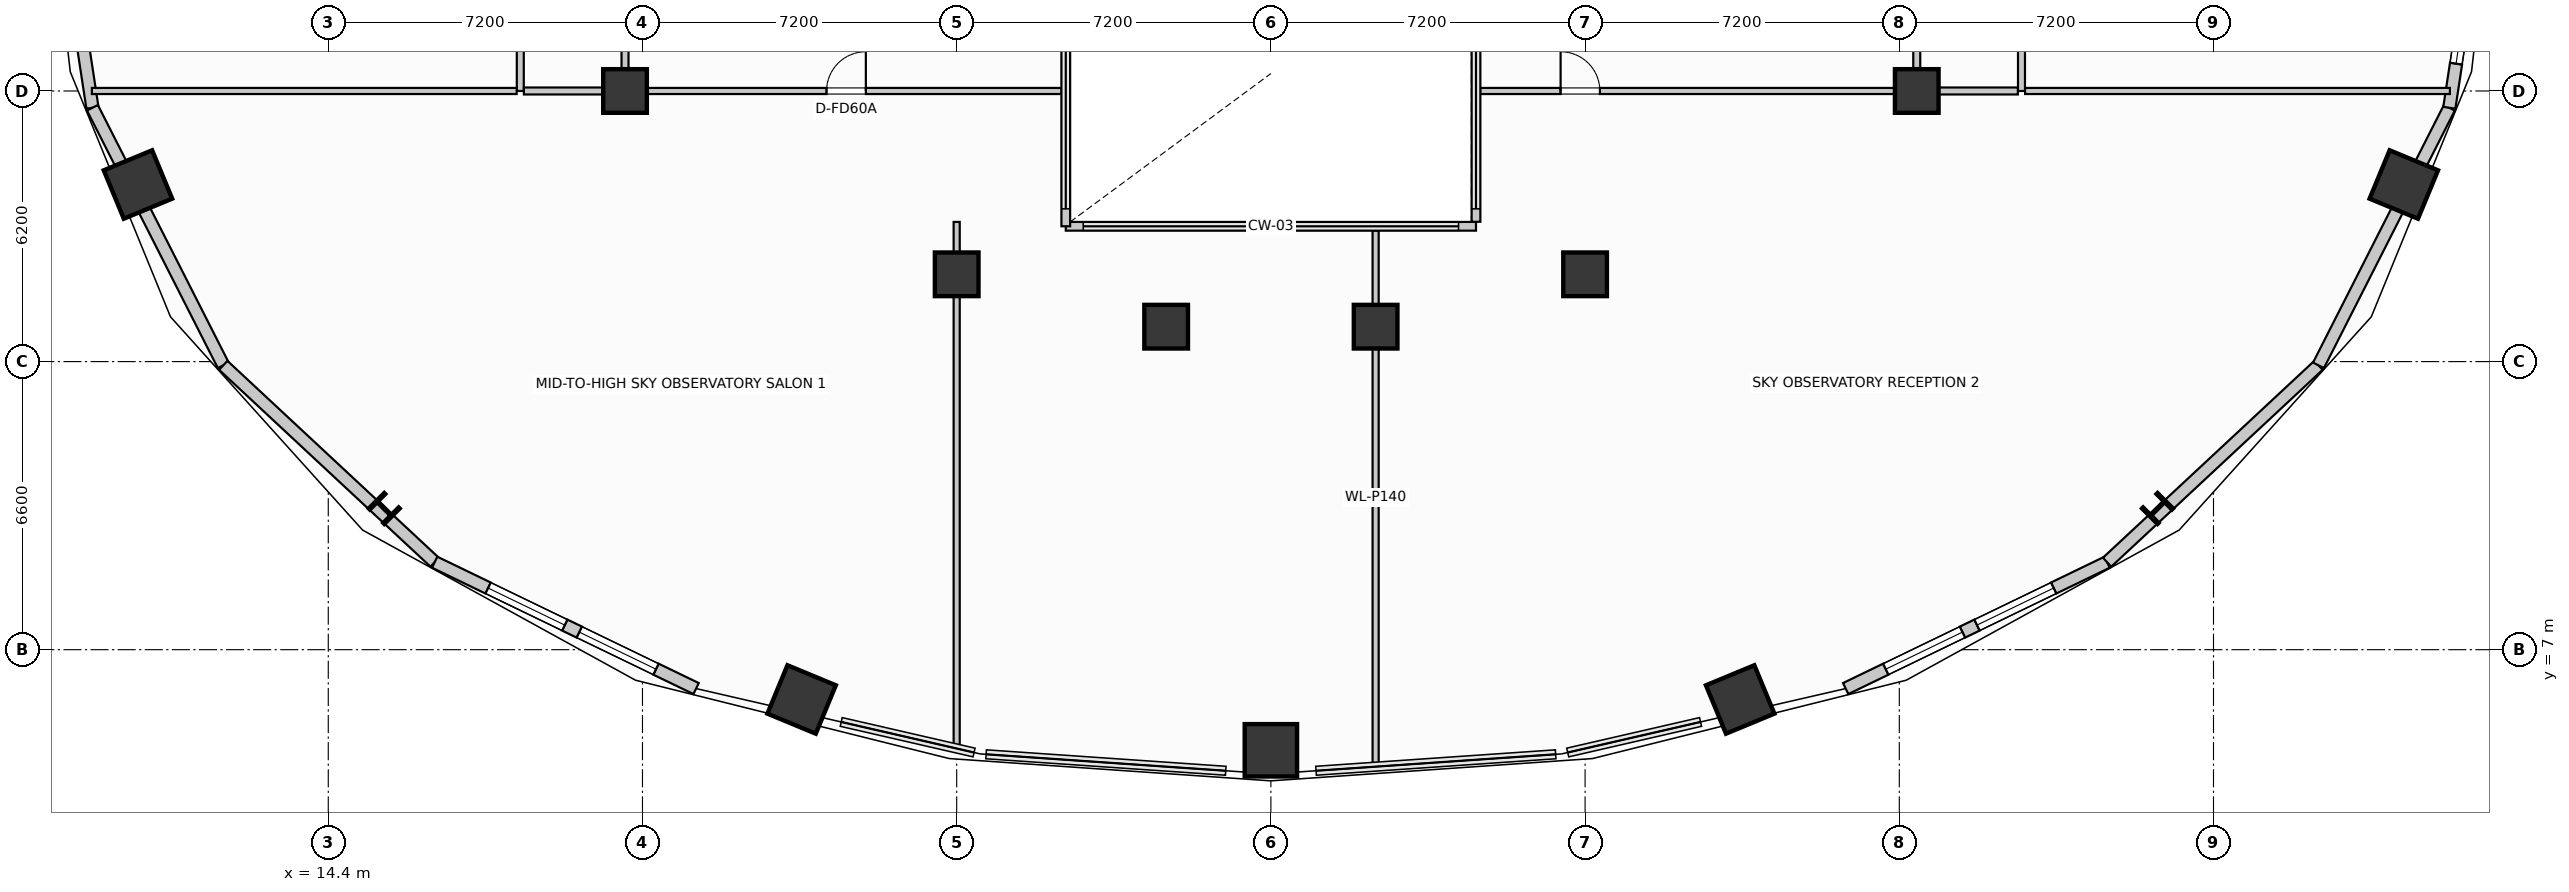
"""IFC4 building model, lengths in metres.
Left out: names, types, materials, properties, quantities, classifications, styles, units other than length and angle.
Written with IfcOpenShell. Run it as: python <this file> out.ifc"""

import sys

from ifc_helpers import new_model, si_unit, direction, frame, frame_2d, origin, origin_2d, place, context, subcontext, project, spatial, rectangle, i_section, extrude, element, fill, save


model = new_model("IFC4")
c1 = context("Model", 3, precision=1e-05, world=origin(), true_north=direction((0.0, 1.0)))
c2 = subcontext(c1, "Body", "Model", "MODEL_VIEW")
j1 = project(units=[si_unit("LENGTHUNIT", "METRE"), si_unit("PLANEANGLEUNIT", "RADIAN")], contexts=[c1])
p1 = place(None, origin())
s1 = spatial("IfcSite", under=j1, at=p1, CompositionType="ELEMENT")
p2 = place(p1, origin())
s2 = spatial("IfcBuilding", under=s1, at=p2, CompositionType="ELEMENT")
p3 = place(p2, frame((0.0, 0.0, 200.35)))
s3 = spatial("IfcBuildingStorey", under=s2, at=p3, CompositionType="ELEMENT", Elevation=200.35)
for number, where, z_axis, x_axis in (
    (1, (50.8, 19.8, 0.0), (0.0, 0.0, 1.0), (1.0, 0.0, 0.0)),
    (2, (43.2, 15.6, 0.0), (0.0, 0.0, 1.0), (1.0, 0.0, 0.0)),
    (3, (38.4, 14.4, 0.0), (0.0, 0.0, 1.0), (1.0, 0.0, 0.0)),
    (4, (33.6, 14.4, 0.0), (0.0, 0.0, 1.0), (1.0, 0.0, 0.0)),
    (5, (28.8, 15.6, 0.0), (0.0, 0.0, 1.0), (1.0, 0.0, 0.0)),
    (6, (21.2, 19.8, 0.0), (0.0, 0.0, 1.0), (1.0, 0.0, 0.0)),
):
    element("IfcColumn", number, at=place(p3, frame(where, z_axis=z_axis, x_axis=x_axis)), inside=s3, PredefinedType="COLUMN", context=c2, shape_type="SweptSolid", body=[
        extrude(rectangle(XDim=1.0, YDim=1.0, at=origin_2d()), origin(), (0.0, 0.0, 1.0), 4.5),
    ])
p4 = place(p3, frame((10.039, 17.657, 0.0), z_axis=(0.0, 0.0, 1.0), x_axis=(-0.923879532511, -0.382683432365, 0.0)))
e7 = element("IfcColumn", 7, at=p4, inside=s3, PredefinedType="COLUMN", context=c2, shape_type="SweptSolid", body=[
    extrude(rectangle(XDim=1.2, YDim=1.2, at=origin_2d()), origin(), (0.0, 0.0, 1.0), 4.5),
])
p5 = place(p3, frame((15.682, 10.235, 0.0), z_axis=(0.0, 0.0, 1.0), x_axis=(-0.707106781187, -0.707106781187, 0.0)))
e8 = element("IfcColumn", 8, at=p5, inside=s3, PredefinedType="COLUMN", context=c2, shape_type="SweptSolid", body=[
    extrude(i_section(OverallWidth=0.5, OverallDepth=0.5, WebThickness=0.022, FlangeThickness=0.032, at=origin_2d()), origin(), (0.0, 0.0, 1.0), 4.5),
])
for number, where, z_axis, x_axis in (
    (9, (25.247, 5.859, 0.0), (0.0, 0.0, 1.0), (-0.383, -0.924, 0.0)),
    (10, (36.0, 4.695, 0.0), (0.0, 0.0, 1.0), (0.0, -1.0, 0.0)),
    (11, (46.753, 5.859, 0.0), (0.0, 0.0, 1.0), (0.383, -0.924, 0.0)),
):
    element("IfcColumn", number, at=place(p3, frame(where, z_axis=z_axis, x_axis=x_axis)), inside=s3, PredefinedType="COLUMN", context=c2, shape_type="SweptSolid", body=[
        extrude(rectangle(XDim=1.2, YDim=1.2, at=origin_2d()), origin(), (0.0, 0.0, 1.0), 4.5),
    ])
p6 = place(p3, frame((56.318, 10.235, 0.0), z_axis=(0.0, 0.0, 1.0), x_axis=(0.707106781187, -0.707106781187, 0.0)))
e12 = element("IfcColumn", 12, at=p6, inside=s3, PredefinedType="COLUMN", context=c2, shape_type="SweptSolid", body=[
    extrude(i_section(OverallWidth=0.5, OverallDepth=0.5, WebThickness=0.022, FlangeThickness=0.032, at=origin_2d()), origin(), (0.0, 0.0, 1.0), 4.5),
])
p7 = place(p3, frame((61.961, 17.657, 0.0), z_axis=(0.0, 0.0, 1.0), x_axis=(0.923879532511, -0.382683432365, 0.0)))
e13 = element("IfcColumn", 13, at=p7, inside=s3, PredefinedType="COLUMN", context=c2, shape_type="SweptSolid", body=[
    extrude(rectangle(XDim=1.2, YDim=1.2, at=origin_2d()), origin(), (0.0, 0.0, 1.0), 4.5),
])
p8 = place(p3, frame((7.994, 26.0, 0.0), z_axis=(0.0, 0.0, 1.0), x_axis=(0.150467697578, -0.988614926038, 0.0)))
e14 = element("IfcWall", 14, at=p8, inside=s3, PredefinedType="STANDARD", context=c2, shape_type="SweptSolid", body=[
    extrude(rectangle(XDim=6.661, YDim=0.28, at=frame_2d((3.33, 0.0))), origin(), (0.0, 0.0, 1.0), 4.26),
])
p9 = place(p8, frame((3.047, 0.0, 0.75)))
e15 = element("IfcOpeningElement", 15, at=p9, cuts=e14, PredefinedType="OPENING", context=c2, shape_type="SweptSolid", body=[
    extrude(rectangle(XDim=1.95, YDim=1.68, at=frame_2d((0.975, 0.84))), frame((0.0, 0.15, 0.0), z_axis=(0.0, -1.0, 0.0), x_axis=(1.0, 0.0, 0.0)), (0.0, 0.0, 1.0), 0.3),
])
p10 = place(p3, frame((8.996, 19.415, 0.0), z_axis=(0.0, 0.0, 1.0), x_axis=(0.453032066879, -0.89149422117, 0.0)))
e16 = element("IfcWall", 16, at=p10, inside=s3, PredefinedType="STANDARD", context=c2, shape_type="SweptSolid", body=[
    extrude(rectangle(XDim=6.619, YDim=0.28, at=frame_2d((3.31, 0.0))), origin(), (0.0, 0.0, 1.0), 3.691),
])
p11 = place(p3, frame((11.994, 13.515, 0.0), z_axis=(0.0, 0.0, 1.0), x_axis=(0.731833707499, -0.681483253329, 0.0)))
e17 = element("IfcWall", 17, at=p11, inside=s3, PredefinedType="STANDARD", context=c2, shape_type="SweptSolid", body=[
    extrude(rectangle(XDim=6.619, YDim=0.28, at=frame_2d((3.309, 0.0))), origin(), (0.0, 0.0, 1.0), 3.691),
])
p12 = place(p3, frame((16.838, 9.004, 0.0), z_axis=(0.0, 0.0, 1.0), x_axis=(0.900371236029, -0.435122554381, 0.0)))
e18 = element("IfcWall", 18, at=p12, inside=s3, PredefinedType="STANDARD", context=c2, shape_type="SweptSolid", body=[
    extrude(rectangle(XDim=6.653, YDim=0.28, at=frame_2d((3.327, 0.0))), origin(), (0.0, 0.0, 1.0), 4.26),
])
p13 = place(p12, frame((1.361, 0.0, 0.75)))
e19 = element("IfcOpeningElement", 19, at=p13, cuts=e18, PredefinedType="OPENING", context=c2, shape_type="SweptSolid", body=[
    extrude(rectangle(XDim=1.95, YDim=1.68, at=frame_2d((0.975, 0.84))), frame((0.0, 0.15, 0.0), z_axis=(0.0, -1.0, 0.0), x_axis=(1.0, 0.0, 0.0)), (0.0, 0.0, 1.0), 0.3),
])
p14 = place(p12, frame((3.682, 0.0, 0.75)))
e20 = element("IfcOpeningElement", 20, at=p14, cuts=e18, PredefinedType="OPENING", context=c2, shape_type="SweptSolid", body=[
    extrude(rectangle(XDim=1.95, YDim=1.68, at=frame_2d((0.975, 0.84))), frame((0.0, 0.15, 0.0), z_axis=(0.0, -1.0, 0.0), x_axis=(1.0, 0.0, 0.0)), (0.0, 0.0, 1.0), 0.3),
])
p15 = place(p3, frame((49.171, 6.109, 0.0), z_axis=(0.0, 0.0, 1.0), x_axis=(0.900371236029, 0.435122554381, 0.0)))
e21 = element("IfcWall", 21, at=p15, inside=s3, PredefinedType="STANDARD", context=c2, shape_type="SweptSolid", body=[
    extrude(rectangle(XDim=6.653, YDim=0.28, at=frame_2d((3.327, 0.0))), origin(), (0.0, 0.0, 1.0), 4.26),
])
p16 = place(p15, frame((1.021, 0.0, 0.75)))
e22 = element("IfcOpeningElement", 22, at=p16, cuts=e21, PredefinedType="OPENING", context=c2, shape_type="SweptSolid", body=[
    extrude(rectangle(XDim=1.95, YDim=1.68, at=frame_2d((0.975, 0.84))), frame((0.0, 0.15, 0.0), z_axis=(0.0, -1.0, 0.0), x_axis=(1.0, 0.0, 0.0)), (0.0, 0.0, 1.0), 0.3),
])
p17 = place(p15, frame((3.343, 0.0, 0.75)))
e23 = element("IfcOpeningElement", 23, at=p17, cuts=e21, PredefinedType="OPENING", context=c2, shape_type="SweptSolid", body=[
    extrude(rectangle(XDim=1.95, YDim=1.68, at=frame_2d((0.975, 0.84))), frame((0.0, 0.15, 0.0), z_axis=(0.0, -1.0, 0.0), x_axis=(1.0, 0.0, 0.0)), (0.0, 0.0, 1.0), 0.3),
])
p18 = place(p3, frame((55.162, 9.004, 0.0), z_axis=(0.0, 0.0, 1.0), x_axis=(0.731833707499, 0.681483253329, 0.0)))
e24 = element("IfcWall", 24, at=p18, inside=s3, PredefinedType="STANDARD", context=c2, shape_type="SweptSolid", body=[
    extrude(rectangle(XDim=6.619, YDim=0.28, at=frame_2d((3.309, 0.0))), origin(), (0.0, 0.0, 1.0), 3.691),
])
p19 = place(p3, frame((60.006, 13.515, 0.0), z_axis=(0.0, 0.0, 1.0), x_axis=(0.453032066879, 0.89149422117, 0.0)))
e25 = element("IfcWall", 25, at=p19, inside=s3, PredefinedType="STANDARD", context=c2, shape_type="SweptSolid", body=[
    extrude(rectangle(XDim=6.619, YDim=0.28, at=frame_2d((3.31, 0.0))), origin(), (0.0, 0.0, 1.0), 3.691),
])
p20 = place(p3, frame((63.004, 19.415, 0.0), z_axis=(0.0, 0.0, 1.0), x_axis=(0.150467697578, 0.988614926038, 0.0)))
e26 = element("IfcWall", 26, at=p20, inside=s3, PredefinedType="STANDARD", context=c2, shape_type="SweptSolid", body=[
    extrude(rectangle(XDim=6.661, YDim=0.28, at=frame_2d((3.33, 0.0))), origin(), (0.0, 0.0, 1.0), 4.26),
])
p21 = place(p20, frame((1.023, 0.0, 0.75)))
e27 = element("IfcOpeningElement", 27, at=p21, cuts=e26, PredefinedType="OPENING", context=c2, shape_type="SweptSolid", body=[
    extrude(rectangle(XDim=1.95, YDim=1.68, at=frame_2d((0.975, 0.84))), frame((0.0, 0.15, 0.0), z_axis=(0.0, -1.0, 0.0), x_axis=(1.0, 0.0, 0.0)), (0.0, 0.0, 1.0), 0.3),
])
p22 = place(p3, frame((40.7, 16.7, 0.0), z_axis=(0.0, 0.0, 1.0), x_axis=(-1.0, 0.0, 0.0)))
e28 = element("IfcWall", 28, at=p22, inside=s3, PredefinedType="PARTITIONING", context=c2, shape_type="SweptSolid", body=[
    extrude(rectangle(XDim=9.4, YDim=0.2, at=frame_2d((4.7, 0.0))), origin(), (0.0, 0.0, 1.0), 4.245),
])
p23 = place(p3, frame((31.3, 16.7, 0.0), z_axis=(0.0, 0.0, 1.0), x_axis=(0.0, 1.0, 0.0)))
e29 = element("IfcWall", 29, at=p23, inside=s3, PredefinedType="PARTITIONING", context=c2, shape_type="SweptSolid", body=[
    extrude(rectangle(XDim=7.0, YDim=0.2, at=frame_2d((3.5, 0.0))), origin(), (0.0, 0.0, 1.0), 4.245),
])
p24 = place(p3, frame((40.7, 23.597, 0.0), z_axis=(0.0, 0.0, 1.0), x_axis=(0.0, -1.0, 0.0)))
e30 = element("IfcWall", 30, at=p24, inside=s3, PredefinedType="PARTITIONING", context=c2, shape_type="SweptSolid", body=[
    extrude(rectangle(XDim=6.794, YDim=0.2, at=frame_2d((3.397, 0.0))), origin(), (0.0, 0.0, 1.0), 4.245),
])
p25 = place(p3, frame((18.8, 19.8, 0.0), z_axis=(0.0, 0.0, 1.0), x_axis=(0.0, 1.0, 0.0)))
e31 = element("IfcWall", 31, at=p25, inside=s3, PredefinedType="PARTITIONING", context=c2, shape_type="SweptSolid", body=[
    extrude(rectangle(XDim=15.75, YDim=0.16, at=frame_2d((7.875, 0.0))), origin(), (0.0, 0.0, 1.0), 4.245),
])
p26 = place(p25, frame((8.203, 0.0, 0.0)))
e32 = element("IfcOpeningElement", 32, at=p26, cuts=e31, PredefinedType="OPENING", context=c2, shape_type="SweptSolid", body=[
    extrude(rectangle(XDim=0.9, YDim=2.0, at=frame_2d((0.45, 1.0))), frame((0.0, 0.09, 0.0), z_axis=(0.0, -1.0, 0.0), x_axis=(1.0, 0.0, 0.0)), (0.0, 0.0, 1.0), 0.18),
])
p27 = place(p25, frame((13.858, 0.0, 0.0)))
e33 = element("IfcOpeningElement", 33, at=p27, cuts=e31, PredefinedType="OPENING", context=c2, shape_type="SweptSolid", body=[
    extrude(rectangle(XDim=0.9, YDim=2.0, at=frame_2d((0.45, 1.0))), frame((0.0, 0.09, 0.0), z_axis=(0.0, -1.0, 0.0), x_axis=(1.0, 0.0, 0.0)), (0.0, 0.0, 1.0), 0.18),
])
p28 = place(p3, frame((18.883, 19.8, 0.0), z_axis=(0.0, 0.0, 1.0), x_axis=(1.0, 0.0, 0.0)))
e34 = element("IfcWall", 34, at=p28, inside=s3, PredefinedType="PARTITIONING", context=c2, shape_type="SweptSolid", body=[
    extrude(rectangle(XDim=2.437, YDim=0.16, at=frame_2d((1.219, 0.0))), origin(), (0.0, 0.0, 1.0), 3.822),
])
p29 = place(p3, frame((21.2, 19.883, 0.0), z_axis=(0.0, 0.0, 1.0), x_axis=(0.0, 1.0, 0.0)))
e35 = element("IfcWall", 35, at=p29, inside=s3, PredefinedType="PARTITIONING", context=c2, shape_type="SweptSolid", body=[
    extrude(rectangle(XDim=4.334, YDim=0.16, at=frame_2d((2.167, 0.0))), origin(), (0.0, 0.0, 1.0), 4.245),
])
p30 = place(p3, frame((53.2, 19.8, 0.0), z_axis=(0.0, 0.0, 1.0), x_axis=(0.0, 1.0, 0.0)))
e36 = element("IfcWall", 36, at=p30, inside=s3, PredefinedType="PARTITIONING", context=c2, shape_type="SweptSolid", body=[
    extrude(rectangle(XDim=15.75, YDim=0.16, at=frame_2d((7.875, 0.0))), origin(), (0.0, 0.0, 1.0), 4.245),
])
p31 = place(p30, frame((8.203, 0.0, 0.0)))
e37 = element("IfcOpeningElement", 37, at=p31, cuts=e36, PredefinedType="OPENING", context=c2, shape_type="SweptSolid", body=[
    extrude(rectangle(XDim=0.9, YDim=2.0, at=frame_2d((0.45, 1.0))), frame((0.0, 0.09, 0.0), z_axis=(0.0, -1.0, 0.0), x_axis=(1.0, 0.0, 0.0)), (0.0, 0.0, 1.0), 0.18),
])
p32 = place(p30, frame((13.858, 0.0, 0.0)))
e38 = element("IfcOpeningElement", 38, at=p32, cuts=e36, PredefinedType="OPENING", context=c2, shape_type="SweptSolid", body=[
    extrude(rectangle(XDim=0.9, YDim=2.0, at=frame_2d((0.45, 1.0))), frame((0.0, 0.09, 0.0), z_axis=(0.0, -1.0, 0.0), x_axis=(1.0, 0.0, 0.0)), (0.0, 0.0, 1.0), 0.18),
])
p33 = place(p3, frame((50.68, 19.8, 0.0), z_axis=(0.0, 0.0, 1.0), x_axis=(1.0, 0.0, 0.0)))
e39 = element("IfcWall", 39, at=p33, inside=s3, PredefinedType="PARTITIONING", context=c2, shape_type="SweptSolid", body=[
    extrude(rectangle(XDim=2.437, YDim=0.16, at=frame_2d((1.219, 0.0))), origin(), (0.0, 0.0, 1.0), 3.822),
])
p34 = place(p3, frame((50.8, 19.883, 0.0), z_axis=(0.0, 0.0, 1.0), x_axis=(0.0, 1.0, 0.0)))
e40 = element("IfcWall", 40, at=p34, inside=s3, PredefinedType="PARTITIONING", context=c2, shape_type="SweptSolid", body=[
    extrude(rectangle(XDim=4.334, YDim=0.16, at=frame_2d((2.167, 0.0))), origin(), (0.0, 0.0, 1.0), 4.245),
])
p35 = place(p3, frame((28.8, 4.782, 0.0), z_axis=(0.0, 0.0, 1.0), x_axis=(0.0, 1.0, 0.0)))
e41 = element("IfcWall", 41, at=p35, inside=s3, PredefinedType="PARTITIONING", context=c2, shape_type="SweptSolid", body=[
    extrude(rectangle(XDim=12.018, YDim=0.14, at=frame_2d((6.009, 0.0))), origin(), (0.0, 0.0, 1.0), 4.245),
])
p36 = place(p3, frame((38.4, 4.365, 0.0), z_axis=(0.0, 0.0, 1.0), x_axis=(0.0, 1.0, 0.0)))
e42 = element("IfcWall", 42, at=p36, inside=s3, PredefinedType="PARTITIONING", context=c2, shape_type="SweptSolid", body=[
    extrude(rectangle(XDim=12.232, YDim=0.14, at=frame_2d((6.116, 0.0))), origin(), (0.0, 0.0, 1.0), 4.245),
])
p37 = place(p3, frame((8.983, 19.8, 0.0), z_axis=(0.0, 0.0, 1.0), x_axis=(1.0, 0.0, 0.0)))
e43 = element("IfcWall", 43, at=p37, inside=s3, PredefinedType="PARTITIONING", context=c2, shape_type="SweptSolid", body=[
    extrude(rectangle(XDim=9.734, YDim=0.14, at=frame_2d((4.867, 0.0))), origin(), (0.0, 0.0, 1.0), 3.822),
])
p38 = place(p3, frame((21.32, 19.8, 0.0), z_axis=(0.0, 0.0, 1.0), x_axis=(1.0, 0.0, 0.0)))
e44 = element("IfcWall", 44, at=p38, inside=s3, PredefinedType="PARTITIONING", context=c2, shape_type="SweptSolid", body=[
    extrude(rectangle(XDim=9.877, YDim=0.14, at=frame_2d((4.938, 0.0))), origin(), (0.0, 0.0, 1.0), 4.245),
])
p39 = place(p38, frame((4.499, 0.0, 0.0)))
e45 = element("IfcOpeningElement", 45, at=p39, cuts=e44, PredefinedType="OPENING", context=c2, shape_type="SweptSolid", body=[
    extrude(rectangle(XDim=0.9, YDim=2.0, at=frame_2d((0.45, 1.0))), frame((0.0, 0.08, 0.0), z_axis=(0.0, -1.0, 0.0), x_axis=(1.0, 0.0, 0.0)), (0.0, 0.0, 1.0), 0.16),
])
p40 = place(p3, frame((40.803, 19.8, 0.0), z_axis=(0.0, 0.0, 1.0), x_axis=(1.0, 0.0, 0.0)))
e46 = element("IfcWall", 46, at=p40, inside=s3, PredefinedType="PARTITIONING", context=c2, shape_type="SweptSolid", body=[
    extrude(rectangle(XDim=9.877, YDim=0.14, at=frame_2d((4.938, 0.0))), origin(), (0.0, 0.0, 1.0), 4.245),
])
p41 = place(p40, frame((1.836, 0.0, 0.0)))
e47 = element("IfcOpeningElement", 47, at=p41, cuts=e46, PredefinedType="OPENING", context=c2, shape_type="SweptSolid", body=[
    extrude(rectangle(XDim=0.9, YDim=2.0, at=frame_2d((0.45, 1.0))), frame((0.0, 0.08, 0.0), z_axis=(0.0, -1.0, 0.0), x_axis=(1.0, 0.0, 0.0)), (0.0, 0.0, 1.0), 0.16),
])
p42 = place(p3, frame((53.283, 19.8, 0.0), z_axis=(0.0, 0.0, 1.0), x_axis=(1.0, 0.0, 0.0)))
e48 = element("IfcWall", 48, at=p42, inside=s3, PredefinedType="PARTITIONING", context=c2, shape_type="SweptSolid", body=[
    extrude(rectangle(XDim=9.734, YDim=0.14, at=frame_2d((4.867, 0.0))), origin(), (0.0, 0.0, 1.0), 3.822),
])
p43 = place(p13, origin())
e49 = element("IfcWindow", 49, at=p43, inside=s3, PartitioningType="SINGLE_PANEL", PredefinedType="WINDOW", context=c2, shape_type="SweptSolid", body=[
    extrude(rectangle(XDim=1.95, YDim=1.68, at=frame_2d((0.975, 0.84))), frame((0.0, 0.03, 0.0), z_axis=(0.0, -1.0, 0.0), x_axis=(1.0, 0.0, 0.0)), (0.0, 0.0, 1.0), 0.06),
])
fill(e19, e49)
p44 = place(p14, origin())
e50 = element("IfcWindow", 50, at=p44, inside=s3, PartitioningType="SINGLE_PANEL", PredefinedType="WINDOW", context=c2, shape_type="SweptSolid", body=[
    extrude(rectangle(XDim=1.95, YDim=1.68, at=frame_2d((0.975, 0.84))), frame((0.0, 0.03, 0.0), z_axis=(0.0, -1.0, 0.0), x_axis=(1.0, 0.0, 0.0)), (0.0, 0.0, 1.0), 0.06),
])
fill(e20, e50)
p45 = place(p16, origin())
e51 = element("IfcWindow", 51, at=p45, inside=s3, PartitioningType="SINGLE_PANEL", PredefinedType="WINDOW", context=c2, shape_type="SweptSolid", body=[
    extrude(rectangle(XDim=1.95, YDim=1.68, at=frame_2d((0.975, 0.84))), frame((0.0, 0.03, 0.0), z_axis=(0.0, -1.0, 0.0), x_axis=(1.0, 0.0, 0.0)), (0.0, 0.0, 1.0), 0.06),
])
fill(e22, e51)
p46 = place(p17, origin())
e52 = element("IfcWindow", 52, at=p46, inside=s3, PartitioningType="SINGLE_PANEL", PredefinedType="WINDOW", context=c2, shape_type="SweptSolid", body=[
    extrude(rectangle(XDim=1.95, YDim=1.68, at=frame_2d((0.975, 0.84))), frame((0.0, 0.03, 0.0), z_axis=(0.0, -1.0, 0.0), x_axis=(1.0, 0.0, 0.0)), (0.0, 0.0, 1.0), 0.06),
])
fill(e23, e52)
p47 = place(p21, origin())
e53 = element("IfcWindow", 53, at=p47, inside=s3, PartitioningType="SINGLE_PANEL", PredefinedType="WINDOW", context=c2, shape_type="SweptSolid", body=[
    extrude(rectangle(XDim=1.95, YDim=1.68, at=frame_2d((0.975, 0.84))), frame((0.0, 0.03, 0.0), z_axis=(0.0, -1.0, 0.0), x_axis=(1.0, 0.0, 0.0)), (0.0, 0.0, 1.0), 0.06),
])
fill(e27, e53)
p48 = place(p39, origin())
e54 = element("IfcDoor", 54, at=p48, inside=s3, OperationType="SINGLE_SWING_RIGHT", PredefinedType="DOOR", context=c2, shape_type="SweptSolid", body=[
    extrude(rectangle(XDim=0.9, YDim=2.0, at=frame_2d((0.45, 1.0))), frame((0.0, 0.025, 0.0), z_axis=(0.0, -1.0, 0.0), x_axis=(1.0, 0.0, 0.0)), (0.0, 0.0, 1.0), 0.05),
])
fill(e45, e54)
p49 = place(p41, origin())
e55 = element("IfcDoor", 55, at=p49, inside=s3, OperationType="SINGLE_SWING_LEFT", PredefinedType="DOOR", context=c2, shape_type="SweptSolid", body=[
    extrude(rectangle(XDim=0.9, YDim=2.0, at=frame_2d((0.45, 1.0))), frame((0.0, 0.025, 0.0), z_axis=(0.0, -1.0, 0.0), x_axis=(1.0, 0.0, 0.0)), (0.0, 0.0, 1.0), 0.05),
])
fill(e47, e55)
save(model, sys.argv[1])
